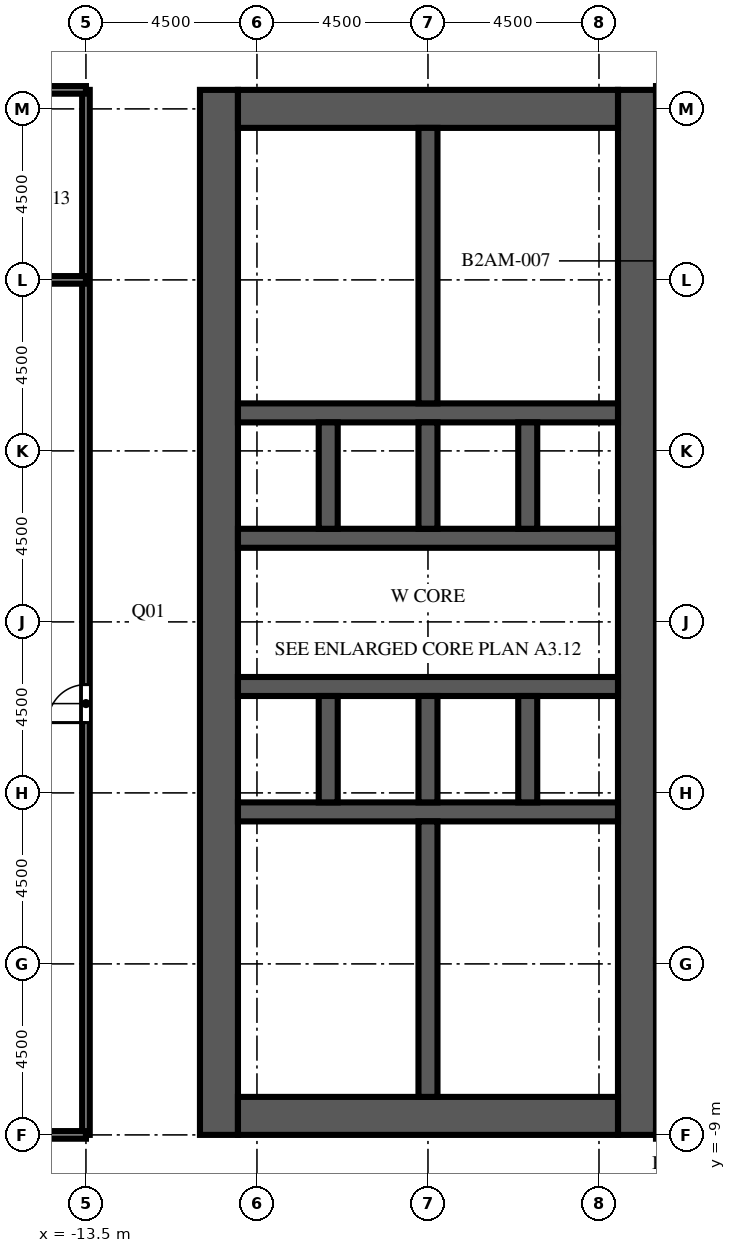
"""IFC4 building model, lengths in metres.
Left out: names, types, materials, properties, quantities, classifications, styles, units other than length and angle.
Written with IfcOpenShell. Run it as: python <this file> out.ifc"""

import sys

from ifc_helpers import new_model, si_unit, direction, frame, frame_2d, origin, place, context, subcontext, project, spatial, rectangle, extrude, element, fill, save


model = new_model("IFC4")
c1 = context("Model", 3, precision=1e-05, world=origin(), true_north=direction((0.0, 1.0)))
c2 = subcontext(c1, "Body", "Model", "MODEL_VIEW")
j1 = project(units=[si_unit("LENGTHUNIT", "METRE"), si_unit("PLANEANGLEUNIT", "RADIAN")], contexts=[c1])
p1 = place(None, origin())
s1 = spatial("IfcSite", under=j1, at=p1, CompositionType="ELEMENT")
p2 = place(p1, origin())
s2 = spatial("IfcBuilding", under=s1, at=p2, CompositionType="ELEMENT")
p3 = place(p2, frame((0.0, 0.0, 70.6)))
s3 = spatial("IfcBuildingStorey", under=s2, at=p3, CompositionType="ELEMENT", Elevation=70.6)
p4 = place(p3, frame((-10.0, -9.0, 0.0), z_axis=(0.0, 0.0, 1.0), x_axis=(0.0, 1.0, 0.0)))
e1 = element("IfcWall", 1, at=p4, inside=s3, PredefinedType="SHEAR", context=c2, shape_type="SweptSolid", body=[
    extrude(rectangle(XDim=27.5, YDim=1.0, at=frame_2d((13.75, 0.0))), origin(), (0.0, 0.0, 1.0), 6.0),
])
p5 = place(p4, frame((12.55, 0.0, 0.0)))
e2 = element("IfcOpeningElement", 2, at=p5, cuts=e1, PredefinedType="OPENING", context=c2, shape_type="SweptSolid", body=[
    extrude(rectangle(XDim=2.4, YDim=2.4, at=frame_2d((1.2, 1.2))), frame((0.0, 0.51, 0.0), z_axis=(0.0, -1.0, 0.0), x_axis=(1.0, 0.0, 0.0)), (0.0, 0.0, 1.0), 1.02),
])
p6 = place(p4, frame((6.825, 0.0, 0.0)))
e3 = element("IfcOpeningElement", 3, at=p6, cuts=e1, PredefinedType="OPENING", context=c2, shape_type="SweptSolid", body=[
    extrude(rectangle(XDim=1.2, YDim=2.1, at=frame_2d((0.6, 1.05))), frame((0.0, 0.51, 0.0), z_axis=(0.0, -1.0, 0.0), x_axis=(1.0, 0.0, 0.0)), (0.0, 0.0, 1.0), 1.02),
])
p7 = place(p4, frame((19.475, 0.0, 0.0)))
e4 = element("IfcOpeningElement", 4, at=p7, cuts=e1, PredefinedType="OPENING", context=c2, shape_type="SweptSolid", body=[
    extrude(rectangle(XDim=1.2, YDim=2.1, at=frame_2d((0.6, 1.05))), frame((0.0, 0.51, 0.0), z_axis=(0.0, -1.0, 0.0), x_axis=(1.0, 0.0, 0.0)), (0.0, 0.0, 1.0), 1.02),
])
p8 = place(p3, frame((1.0, -9.0, 0.0), z_axis=(0.0, 0.0, 1.0), x_axis=(0.0, 1.0, 0.0)))
e5 = element("IfcWall", 5, at=p8, inside=s3, PredefinedType="SHEAR", context=c2, shape_type="SweptSolid", body=[
    extrude(rectangle(XDim=27.5, YDim=1.0, at=frame_2d((13.75, 0.0))), origin(), (0.0, 0.0, 1.0), 6.0),
])
p9 = place(p8, frame((12.55, 0.0, 0.0)))
e6 = element("IfcOpeningElement", 6, at=p9, cuts=e5, PredefinedType="OPENING", context=c2, shape_type="SweptSolid", body=[
    extrude(rectangle(XDim=2.4, YDim=2.4, at=frame_2d((1.2, 1.2))), frame((0.0, 0.51, 0.0), z_axis=(0.0, -1.0, 0.0), x_axis=(1.0, 0.0, 0.0)), (0.0, 0.0, 1.0), 1.02),
])
p10 = place(p8, frame((5.475, 0.0, 0.0)))
e7 = element("IfcOpeningElement", 7, at=p10, cuts=e5, PredefinedType="OPENING", context=c2, shape_type="SweptSolid", body=[
    extrude(rectangle(XDim=1.2, YDim=2.1, at=frame_2d((0.6, 1.05))), frame((0.0, 0.51, 0.0), z_axis=(0.0, -1.0, 0.0), x_axis=(1.0, 0.0, 0.0)), (0.0, 0.0, 1.0), 1.02),
])
p11 = place(p8, frame((19.475, 0.0, 0.0)))
e8 = element("IfcOpeningElement", 8, at=p11, cuts=e5, PredefinedType="OPENING", context=c2, shape_type="SweptSolid", body=[
    extrude(rectangle(XDim=1.0, YDim=2.1, at=frame_2d((0.5, 1.05))), frame((0.0, 0.51, 0.0), z_axis=(0.0, -1.0, 0.0), x_axis=(1.0, 0.0, 0.0)), (0.0, 0.0, 1.0), 1.02),
])
p12 = place(p8, frame((21.106, 0.0, 0.0)))
e9 = element("IfcOpeningElement", 9, at=p12, cuts=e5, PredefinedType="OPENING", context=c2, shape_type="SweptSolid", body=[
    extrude(rectangle(XDim=1.0, YDim=2.1, at=frame_2d((0.5, 1.05))), frame((0.0, 0.51, 0.0), z_axis=(0.0, -1.0, 0.0), x_axis=(1.0, 0.0, 0.0)), (0.0, 0.0, 1.0), 1.02),
])
p13 = place(p8, frame((23.1, 0.0, 0.0)))
e10 = element("IfcOpeningElement", 10, at=p13, cuts=e5, PredefinedType="OPENING", context=c2, shape_type="SweptSolid", body=[
    extrude(rectangle(XDim=1.0, YDim=2.1, at=frame_2d((0.5, 1.05))), frame((0.0, 0.51, 0.0), z_axis=(0.0, -1.0, 0.0), x_axis=(1.0, 0.0, 0.0)), (0.0, 0.0, 1.0), 1.02),
])
p14 = place(p8, frame((25.094, 0.0, 0.0)))
e11 = element("IfcOpeningElement", 11, at=p14, cuts=e5, PredefinedType="OPENING", context=c2, shape_type="SweptSolid", body=[
    extrude(rectangle(XDim=1.0, YDim=2.1, at=frame_2d((0.5, 1.05))), frame((0.0, 0.51, 0.0), z_axis=(0.0, -1.0, 0.0), x_axis=(1.0, 0.0, 0.0)), (0.0, 0.0, 1.0), 1.02),
])
for number, where, z_axis, x_axis in (
    (12, (-9.5, -8.5, 0.0), (0.0, 0.0, 1.0), (1.0, 0.0, 0.0)),
    (13, (-9.5, 18.0, 0.0), (0.0, 0.0, 1.0), (1.0, 0.0, 0.0)),
):
    element("IfcWall", number, at=place(p3, frame(where, z_axis=z_axis, x_axis=x_axis)), inside=s3, PredefinedType="SHEAR", context=c2, shape_type="SweptSolid", body=[
        extrude(rectangle(XDim=10.0, YDim=1.0, at=frame_2d((5.0, 0.0))), origin(), (0.0, 0.0, 1.0), 6.0),
    ])
p15 = place(p3, frame((-9.5, -0.5, 0.0), z_axis=(0.0, 0.0, 1.0), x_axis=(1.0, 0.0, 0.0)))
e14 = element("IfcWall", 14, at=p15, inside=s3, PredefinedType="SHEAR", context=c2, shape_type="SweptSolid", body=[
    extrude(rectangle(XDim=10.0, YDim=0.5, at=frame_2d((5.0, 0.0))), origin(), (0.0, 0.0, 1.0), 6.0),
])
p16 = place(p3, frame((-9.5, 2.8, 0.0), z_axis=(0.0, 0.0, 1.0), x_axis=(1.0, 0.0, 0.0)))
e15 = element("IfcWall", 15, at=p16, inside=s3, PredefinedType="SHEAR", context=c2, shape_type="SweptSolid", body=[
    extrude(rectangle(XDim=10.0, YDim=0.5, at=frame_2d((5.0, 0.0))), origin(), (0.0, 0.0, 1.0), 6.0),
])
p17 = place(p16, frame((0.512, 0.0, 0.0)))
e16 = element("IfcOpeningElement", 16, at=p17, cuts=e15, PredefinedType="OPENING", context=c2, shape_type="SweptSolid", body=[
    extrude(rectangle(XDim=1.1, YDim=2.1, at=frame_2d((0.55, 1.05))), frame((0.0, 0.26, 0.0), z_axis=(0.0, -1.0, 0.0), x_axis=(1.0, 0.0, 0.0)), (0.0, 0.0, 1.0), 0.52),
])
p18 = place(p16, frame((3.137, 0.0, 0.0)))
e17 = element("IfcOpeningElement", 17, at=p18, cuts=e15, PredefinedType="OPENING", context=c2, shape_type="SweptSolid", body=[
    extrude(rectangle(XDim=1.1, YDim=2.1, at=frame_2d((0.55, 1.05))), frame((0.0, 0.26, 0.0), z_axis=(0.0, -1.0, 0.0), x_axis=(1.0, 0.0, 0.0)), (0.0, 0.0, 1.0), 0.52),
])
p19 = place(p16, frame((8.387, 0.0, 0.0)))
e18 = element("IfcOpeningElement", 18, at=p19, cuts=e15, PredefinedType="OPENING", context=c2, shape_type="SweptSolid", body=[
    extrude(rectangle(XDim=1.1, YDim=2.1, at=frame_2d((0.55, 1.05))), frame((0.0, 0.26, 0.0), z_axis=(0.0, -1.0, 0.0), x_axis=(1.0, 0.0, 0.0)), (0.0, 0.0, 1.0), 0.52),
])
p20 = place(p3, frame((-9.5, 6.7, 0.0), z_axis=(0.0, 0.0, 1.0), x_axis=(1.0, 0.0, 0.0)))
e19 = element("IfcWall", 19, at=p20, inside=s3, PredefinedType="SHEAR", context=c2, shape_type="SweptSolid", body=[
    extrude(rectangle(XDim=10.0, YDim=0.5, at=frame_2d((5.0, 0.0))), origin(), (0.0, 0.0, 1.0), 6.0),
])
p21 = place(p20, frame((0.512, 0.0, 0.0)))
e20 = element("IfcOpeningElement", 20, at=p21, cuts=e19, PredefinedType="OPENING", context=c2, shape_type="SweptSolid", body=[
    extrude(rectangle(XDim=1.1, YDim=2.1, at=frame_2d((0.55, 1.05))), frame((0.0, 0.26, 0.0), z_axis=(0.0, -1.0, 0.0), x_axis=(1.0, 0.0, 0.0)), (0.0, 0.0, 1.0), 0.52),
])
p22 = place(p20, frame((3.188, 0.0, 0.0)))
e21 = element("IfcOpeningElement", 21, at=p22, cuts=e19, PredefinedType="OPENING", context=c2, shape_type="SweptSolid", body=[
    extrude(rectangle(XDim=1.0, YDim=2.1, at=frame_2d((0.5, 1.05))), frame((0.0, 0.26, 0.0), z_axis=(0.0, -1.0, 0.0), x_axis=(1.0, 0.0, 0.0)), (0.0, 0.0, 1.0), 0.52),
])
p23 = place(p20, frame((5.812, 0.0, 0.0)))
e22 = element("IfcOpeningElement", 22, at=p23, cuts=e19, PredefinedType="OPENING", context=c2, shape_type="SweptSolid", body=[
    extrude(rectangle(XDim=1.0, YDim=2.1, at=frame_2d((0.5, 1.05))), frame((0.0, 0.26, 0.0), z_axis=(0.0, -1.0, 0.0), x_axis=(1.0, 0.0, 0.0)), (0.0, 0.0, 1.0), 0.52),
])
p24 = place(p20, frame((8.438, 0.0, 0.0)))
e23 = element("IfcOpeningElement", 23, at=p24, cuts=e19, PredefinedType="OPENING", context=c2, shape_type="SweptSolid", body=[
    extrude(rectangle(XDim=1.0, YDim=2.1, at=frame_2d((0.5, 1.05))), frame((0.0, 0.26, 0.0), z_axis=(0.0, -1.0, 0.0), x_axis=(1.0, 0.0, 0.0)), (0.0, 0.0, 1.0), 0.52),
])
p25 = place(p3, frame((-9.5, 10.0, 0.0), z_axis=(0.0, 0.0, 1.0), x_axis=(1.0, 0.0, 0.0)))
e24 = element("IfcWall", 24, at=p25, inside=s3, PredefinedType="SHEAR", context=c2, shape_type="SweptSolid", body=[
    extrude(rectangle(XDim=10.0, YDim=0.5, at=frame_2d((5.0, 0.0))), origin(), (0.0, 0.0, 1.0), 6.0),
])
for number, where, z_axis, x_axis in (
    (25, (-7.125, -0.25, 0.0), (0.0, 0.0, 1.0), (0.0, 1.0, 0.0)),
    (26, (-7.125, 6.95, 0.0), (0.0, 0.0, 1.0), (0.0, 1.0, 0.0)),
    (27, (-4.5, -0.25, 0.0), (0.0, 0.0, 1.0), (0.0, 1.0, 0.0)),
    (28, (-4.5, 6.95, 0.0), (0.0, 0.0, 1.0), (0.0, 1.0, 0.0)),
    (29, (-1.875, -0.25, 0.0), (0.0, 0.0, 1.0), (0.0, 1.0, 0.0)),
    (30, (-1.875, 6.95, 0.0), (0.0, 0.0, 1.0), (0.0, 1.0, 0.0)),
):
    element("IfcWall", number, at=place(p3, frame(where, z_axis=z_axis, x_axis=x_axis)), inside=s3, PredefinedType="SHEAR", context=c2, shape_type="SweptSolid", body=[
        extrude(rectangle(XDim=2.8, YDim=0.5, at=frame_2d((1.4, 0.0))), origin(), (0.0, 0.0, 1.0), 6.0),
    ])
for number, where, z_axis, x_axis in (
    (31, (-4.5, -8.0, 0.0), (0.0, 0.0, 1.0), (0.0, 1.0, 0.0)),
    (32, (-4.5, 10.25, 0.0), (0.0, 0.0, 1.0), (0.0, 1.0, 0.0)),
):
    element("IfcWall", number, at=place(p3, frame(where, z_axis=z_axis, x_axis=x_axis)), inside=s3, PredefinedType="SHEAR", context=c2, shape_type="SweptSolid", body=[
        extrude(rectangle(XDim=7.25, YDim=0.5, at=frame_2d((3.625, 0.0))), origin(), (0.0, 0.0, 1.0), 6.0),
    ])
p26 = place(p3, frame((-1.0, -5.1, 0.0), z_axis=(0.0, 0.0, 1.0), x_axis=(1.0, 0.0, 0.0)))
e33 = element("IfcWall", 33, at=p26, inside=s3, PredefinedType="PARTITIONING", context=c2, shape_type="SweptSolid", body=[
    extrude(rectangle(XDim=1.5, YDim=0.1, at=frame_2d((0.75, 0.0))), origin(), (0.0, 0.0, 1.0), 5.4),
])
p27 = place(p26, frame((0.25, 0.0, 0.0)))
e34 = element("IfcOpeningElement", 34, at=p27, cuts=e33, PredefinedType="OPENING", context=c2, shape_type="SweptSolid", body=[
    extrude(rectangle(XDim=1.0, YDim=2.1, at=frame_2d((0.5, 1.05))), frame((0.0, 0.06, 0.0), z_axis=(0.0, -1.0, 0.0), x_axis=(1.0, 0.0, 0.0)), (0.0, 0.0, 1.0), 0.12),
])
p28 = place(p3, frame((-1.0, -5.1, 0.0), z_axis=(0.0, 0.0, 1.0), x_axis=(0.0, 1.0, 0.0)))
e35 = element("IfcWall", 35, at=p28, inside=s3, PredefinedType="PARTITIONING", context=c2, shape_type="SweptSolid", body=[
    extrude(rectangle(XDim=2.175, YDim=0.1, at=frame_2d((1.087, 0.0))), origin(), (0.0, 0.0, 1.0), 5.4),
])
p29 = place(p28, frame((0.587, 0.0, 0.0)))
e36 = element("IfcOpeningElement", 36, at=p29, cuts=e35, PredefinedType="OPENING", context=c2, shape_type="SweptSolid", body=[
    extrude(rectangle(XDim=1.0, YDim=2.1, at=frame_2d((0.5, 1.05))), frame((0.0, 0.06, 0.0), z_axis=(0.0, -1.0, 0.0), x_axis=(1.0, 0.0, 0.0)), (0.0, 0.0, 1.0), 0.12),
])
p30 = place(p3, frame((-1.0, -2.925, 0.0), z_axis=(0.0, 0.0, 1.0), x_axis=(0.0, 1.0, 0.0)))
e37 = element("IfcWall", 37, at=p30, inside=s3, PredefinedType="PARTITIONING", context=c2, shape_type="SweptSolid", body=[
    extrude(rectangle(XDim=2.175, YDim=0.1, at=frame_2d((1.087, 0.0))), origin(), (0.0, 0.0, 1.0), 5.4),
])
p31 = place(p30, frame((0.587, 0.0, 0.0)))
e38 = element("IfcOpeningElement", 38, at=p31, cuts=e37, PredefinedType="OPENING", context=c2, shape_type="SweptSolid", body=[
    extrude(rectangle(XDim=1.0, YDim=2.1, at=frame_2d((0.5, 1.05))), frame((0.0, 0.06, 0.0), z_axis=(0.0, -1.0, 0.0), x_axis=(1.0, 0.0, 0.0)), (0.0, 0.0, 1.0), 0.12),
])
for number, where, z_axis, x_axis in (
    (39, (-4.25, -5.1, 0.0), (0.0, 0.0, 1.0), (1.0, 0.0, 0.0)),
    (40, (-4.25, -2.925, 0.0), (0.0, 0.0, 1.0), (1.0, 0.0, 0.0)),
):
    element("IfcWall", number, at=place(p3, frame(where, z_axis=z_axis, x_axis=x_axis)), inside=s3, PredefinedType="PARTITIONING", context=c2, shape_type="SweptSolid", body=[
        extrude(rectangle(XDim=3.25, YDim=0.1, at=frame_2d((1.625, 0.0))), origin(), (0.0, 0.0, 1.0), 5.4),
    ])
for number, where, z_axis, x_axis in (
    (41, (-4.25, 11.7, 0.0), (0.0, 0.0, 1.0), (1.0, 0.0, 0.0)),
    (42, (-4.25, 13.512, 0.0), (0.0, 0.0, 1.0), (1.0, 0.0, 0.0)),
    (43, (-4.25, 15.688, 0.0), (0.0, 0.0, 1.0), (1.0, 0.0, 0.0)),
):
    element("IfcWall", number, at=place(p3, frame(where, z_axis=z_axis, x_axis=x_axis)), inside=s3, PredefinedType="PARTITIONING", context=c2, shape_type="SweptSolid", body=[
        extrude(rectangle(XDim=4.75, YDim=0.1, at=frame_2d((2.375, 0.0))), origin(), (0.0, 0.0, 1.0), 5.4),
    ])
p32 = place(p3, frame((-13.5, -9.0, 0.0), z_axis=(0.0, 0.0, 1.0), x_axis=(0.0, 1.0, 0.0)))
e44 = element("IfcWall", 44, at=p32, inside=s3, PredefinedType="PARTITIONING", context=c2, shape_type="SweptSolid", body=[
    extrude(rectangle(XDim=27.5, YDim=0.2, at=frame_2d((13.75, 0.0))), origin(), (0.0, 0.0, 1.0), 5.4),
])
p33 = place(p32, frame((10.85, 0.0, 0.0)))
e45 = element("IfcOpeningElement", 45, at=p33, cuts=e44, PredefinedType="OPENING", context=c2, shape_type="SweptSolid", body=[
    extrude(rectangle(XDim=1.0, YDim=2.1, at=frame_2d((0.5, 1.05))), frame((0.0, 0.11, 0.0), z_axis=(0.0, -1.0, 0.0), x_axis=(1.0, 0.0, 0.0)), (0.0, 0.0, 1.0), 0.22),
])
p34 = place(p3, frame((-17.2, -9.0, 0.0), z_axis=(0.0, 0.0, 1.0), x_axis=(1.0, 0.0, 0.0)))
e46 = element("IfcWall", 46, at=p34, inside=s3, PredefinedType="PARTITIONING", context=c2, shape_type="SweptSolid", body=[
    extrude(rectangle(XDim=3.7, YDim=0.2, at=frame_2d((1.85, 0.0))), origin(), (0.0, 0.0, 1.0), 5.4),
])
p35 = place(p3, frame((-21.8, 13.5, 0.0), z_axis=(0.0, 0.0, 1.0), x_axis=(1.0, 0.0, 0.0)))
e47 = element("IfcWall", 47, at=p35, inside=s3, PredefinedType="PARTITIONING", context=c2, shape_type="SweptSolid", body=[
    extrude(rectangle(XDim=8.3, YDim=0.2, at=frame_2d((4.15, 0.0))), origin(), (0.0, 0.0, 1.0), 5.4),
])
p36 = place(p3, frame((-17.2, 18.5, 0.0), z_axis=(0.0, 0.0, 1.0), x_axis=(1.0, 0.0, 0.0)))
e48 = element("IfcWall", 48, at=p36, inside=s3, PredefinedType="PARTITIONING", context=c2, shape_type="SweptSolid", body=[
    extrude(rectangle(XDim=3.7, YDim=0.2, at=frame_2d((1.85, 0.0))), origin(), (0.0, 0.0, 1.0), 5.4),
])
p37 = place(p17, origin())
e49 = element("IfcDoor", 49, at=p37, inside=s3, OperationType="DOUBLE_DOOR_SLIDING", PredefinedType="DOOR", context=c2, shape_type="SweptSolid", body=[
    extrude(rectangle(XDim=1.1, YDim=2.1, at=frame_2d((0.55, 1.05))), frame((0.0, 0.025, 0.0), z_axis=(0.0, -1.0, 0.0), x_axis=(1.0, 0.0, 0.0)), (0.0, 0.0, 1.0), 0.05),
])
fill(e16, e49)
p38 = place(p18, origin())
e50 = element("IfcDoor", 50, at=p38, inside=s3, OperationType="DOUBLE_DOOR_SLIDING", PredefinedType="DOOR", context=c2, shape_type="SweptSolid", body=[
    extrude(rectangle(XDim=1.1, YDim=2.1, at=frame_2d((0.55, 1.05))), frame((0.0, 0.025, 0.0), z_axis=(0.0, -1.0, 0.0), x_axis=(1.0, 0.0, 0.0)), (0.0, 0.0, 1.0), 0.05),
])
fill(e17, e50)
p39 = place(p19, origin())
e51 = element("IfcDoor", 51, at=p39, inside=s3, OperationType="DOUBLE_DOOR_SLIDING", PredefinedType="DOOR", context=c2, shape_type="SweptSolid", body=[
    extrude(rectangle(XDim=1.1, YDim=2.1, at=frame_2d((0.55, 1.05))), frame((0.0, 0.025, 0.0), z_axis=(0.0, -1.0, 0.0), x_axis=(1.0, 0.0, 0.0)), (0.0, 0.0, 1.0), 0.05),
])
fill(e18, e51)
p40 = place(p21, origin())
e52 = element("IfcDoor", 52, at=p40, inside=s3, OperationType="DOUBLE_DOOR_SLIDING", PredefinedType="DOOR", context=c2, shape_type="SweptSolid", body=[
    extrude(rectangle(XDim=1.1, YDim=2.1, at=frame_2d((0.55, 1.05))), frame((0.0, 0.025, 0.0), z_axis=(0.0, -1.0, 0.0), x_axis=(1.0, 0.0, 0.0)), (0.0, 0.0, 1.0), 0.05),
])
fill(e20, e52)
p41 = place(p5, origin())
e53 = element("IfcDoor", 53, at=p41, inside=s3, OperationType="DOUBLE_DOOR_DOUBLE_SWING", PredefinedType="DOOR", context=c2, shape_type="SweptSolid", body=[
    extrude(rectangle(XDim=2.4, YDim=2.4, at=frame_2d((1.2, 1.2))), frame((0.0, 0.025, 0.0), z_axis=(0.0, -1.0, 0.0), x_axis=(1.0, 0.0, 0.0)), (0.0, 0.0, 1.0), 0.05),
])
fill(e2, e53)
p42 = place(p9, origin())
e54 = element("IfcDoor", 54, at=p42, inside=s3, OperationType="DOUBLE_DOOR_DOUBLE_SWING", PredefinedType="DOOR", context=c2, shape_type="SweptSolid", body=[
    extrude(rectangle(XDim=2.4, YDim=2.4, at=frame_2d((1.2, 1.2))), frame((0.0, 0.025, 0.0), z_axis=(0.0, -1.0, 0.0), x_axis=(1.0, 0.0, 0.0)), (0.0, 0.0, 1.0), 0.05),
])
fill(e6, e54)
p43 = place(p6, origin())
e55 = element("IfcDoor", 55, at=p43, inside=s3, OperationType="SINGLE_SWING_LEFT", PredefinedType="DOOR", context=c2, shape_type="SweptSolid", body=[
    extrude(rectangle(XDim=1.2, YDim=2.1, at=frame_2d((0.6, 1.05))), frame((0.0, 0.025, 0.0), z_axis=(0.0, -1.0, 0.0), x_axis=(1.0, 0.0, 0.0)), (0.0, 0.0, 1.0), 0.05),
])
fill(e3, e55)
p44 = place(p7, origin())
e56 = element("IfcDoor", 56, at=p44, inside=s3, OperationType="SINGLE_SWING_LEFT", PredefinedType="DOOR", context=c2, shape_type="SweptSolid", body=[
    extrude(rectangle(XDim=1.2, YDim=2.1, at=frame_2d((0.6, 1.05))), frame((0.0, 0.025, 0.0), z_axis=(0.0, -1.0, 0.0), x_axis=(1.0, 0.0, 0.0)), (0.0, 0.0, 1.0), 0.05),
])
fill(e4, e56)
p45 = place(p22, origin())
e57 = element("IfcDoor", 57, at=p45, inside=s3, OperationType="SINGLE_SWING_RIGHT", PredefinedType="DOOR", context=c2, shape_type="SweptSolid", body=[
    extrude(rectangle(XDim=1.0, YDim=2.1, at=frame_2d((0.5, 1.05))), frame((0.0, 0.025, 0.0), z_axis=(0.0, -1.0, 0.0), x_axis=(1.0, 0.0, 0.0)), (0.0, 0.0, 1.0), 0.05),
])
fill(e21, e57)
p46 = place(p23, origin())
e58 = element("IfcDoor", 58, at=p46, inside=s3, OperationType="SINGLE_SWING_LEFT", PredefinedType="DOOR", context=c2, shape_type="SweptSolid", body=[
    extrude(rectangle(XDim=1.0, YDim=2.1, at=frame_2d((0.5, 1.05))), frame((0.0, 0.025, 0.0), z_axis=(0.0, -1.0, 0.0), x_axis=(1.0, 0.0, 0.0)), (0.0, 0.0, 1.0), 0.05),
])
fill(e22, e58)
p47 = place(p24, origin())
e59 = element("IfcDoor", 59, at=p47, inside=s3, OperationType="SINGLE_SWING_RIGHT", PredefinedType="DOOR", context=c2, shape_type="SweptSolid", body=[
    extrude(rectangle(XDim=1.0, YDim=2.1, at=frame_2d((0.5, 1.05))), frame((0.0, 0.025, 0.0), z_axis=(0.0, -1.0, 0.0), x_axis=(1.0, 0.0, 0.0)), (0.0, 0.0, 1.0), 0.05),
])
fill(e23, e59)
p48 = place(p10, origin())
e60 = element("IfcDoor", 60, at=p48, inside=s3, OperationType="SINGLE_SWING_LEFT", PredefinedType="DOOR", context=c2, shape_type="SweptSolid", body=[
    extrude(rectangle(XDim=1.2, YDim=2.1, at=frame_2d((0.6, 1.05))), frame((0.0, 0.475, 0.0), z_axis=(0.0, -1.0, 0.0), x_axis=(1.0, 0.0, 0.0)), (0.0, 0.0, 1.0), 0.05),
])
fill(e7, e60)
p49 = place(p27, origin())
e61 = element("IfcDoor", 61, at=p49, inside=s3, OperationType="SINGLE_SWING_RIGHT", PredefinedType="DOOR", context=c2, shape_type="SweptSolid", body=[
    extrude(rectangle(XDim=1.0, YDim=2.1, at=frame_2d((0.5, 1.05))), frame((0.0, 0.025, 0.0), z_axis=(0.0, -1.0, 0.0), x_axis=(1.0, 0.0, 0.0)), (0.0, 0.0, 1.0), 0.05),
])
fill(e34, e61)
p50 = place(p29, origin())
e62 = element("IfcDoor", 62, at=p50, inside=s3, OperationType="SINGLE_SWING_LEFT", PredefinedType="DOOR", context=c2, shape_type="SweptSolid", body=[
    extrude(rectangle(XDim=1.0, YDim=2.1, at=frame_2d((0.5, 1.05))), frame((0.0, 0.025, 0.0), z_axis=(0.0, -1.0, 0.0), x_axis=(1.0, 0.0, 0.0)), (0.0, 0.0, 1.0), 0.05),
])
fill(e36, e62)
p51 = place(p31, origin())
e63 = element("IfcDoor", 63, at=p51, inside=s3, OperationType="SINGLE_SWING_RIGHT", PredefinedType="DOOR", context=c2, shape_type="SweptSolid", body=[
    extrude(rectangle(XDim=1.0, YDim=2.1, at=frame_2d((0.5, 1.05))), frame((0.0, 0.025, 0.0), z_axis=(0.0, -1.0, 0.0), x_axis=(1.0, 0.0, 0.0)), (0.0, 0.0, 1.0), 0.05),
])
fill(e38, e63)
p52 = place(p11, origin())
e64 = element("IfcDoor", 64, at=p52, inside=s3, OperationType="SINGLE_SWING_LEFT", PredefinedType="DOOR", context=c2, shape_type="SweptSolid", body=[
    extrude(rectangle(XDim=1.0, YDim=2.1, at=frame_2d((0.5, 1.05))), frame((0.0, 0.475, 0.0), z_axis=(0.0, -1.0, 0.0), x_axis=(1.0, 0.0, 0.0)), (0.0, 0.0, 1.0), 0.05),
])
fill(e8, e64)
p53 = place(p12, origin())
e65 = element("IfcDoor", 65, at=p53, inside=s3, OperationType="SINGLE_SWING_RIGHT", PredefinedType="DOOR", context=c2, shape_type="SweptSolid", body=[
    extrude(rectangle(XDim=1.0, YDim=2.1, at=frame_2d((0.5, 1.05))), frame((0.0, 0.475, 0.0), z_axis=(0.0, -1.0, 0.0), x_axis=(1.0, 0.0, 0.0)), (0.0, 0.0, 1.0), 0.05),
])
fill(e9, e65)
p54 = place(p13, origin())
e66 = element("IfcDoor", 66, at=p54, inside=s3, OperationType="SINGLE_SWING_LEFT", PredefinedType="DOOR", context=c2, shape_type="SweptSolid", body=[
    extrude(rectangle(XDim=1.0, YDim=2.1, at=frame_2d((0.5, 1.05))), frame((0.0, 0.475, 0.0), z_axis=(0.0, -1.0, 0.0), x_axis=(1.0, 0.0, 0.0)), (0.0, 0.0, 1.0), 0.05),
])
fill(e10, e66)
p55 = place(p14, origin())
e67 = element("IfcDoor", 67, at=p55, inside=s3, OperationType="SINGLE_SWING_RIGHT", PredefinedType="DOOR", context=c2, shape_type="SweptSolid", body=[
    extrude(rectangle(XDim=1.0, YDim=2.1, at=frame_2d((0.5, 1.05))), frame((0.0, 0.475, 0.0), z_axis=(0.0, -1.0, 0.0), x_axis=(1.0, 0.0, 0.0)), (0.0, 0.0, 1.0), 0.05),
])
fill(e11, e67)
p56 = place(p33, origin())
e68 = element("IfcDoor", 68, at=p56, inside=s3, OperationType="SINGLE_SWING_LEFT", PredefinedType="DOOR", context=c2, shape_type="SweptSolid", body=[
    extrude(rectangle(XDim=1.0, YDim=2.1, at=frame_2d((0.5, 1.05))), frame((0.0, 0.025, 0.0), z_axis=(0.0, -1.0, 0.0), x_axis=(1.0, 0.0, 0.0)), (0.0, 0.0, 1.0), 0.05),
])
fill(e45, e68)
save(model, sys.argv[1])
